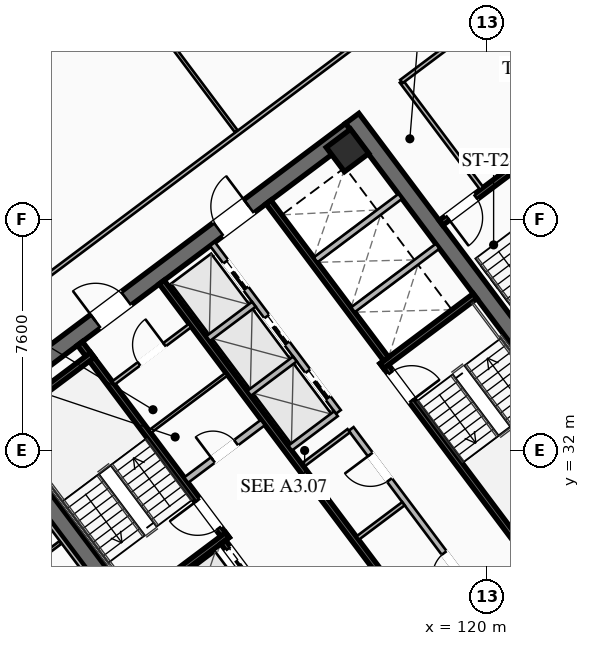
"""IFC4 building model, lengths in metres.
Left out: names, types, materials, properties, quantities, classifications, styles, units other than length and angle.
Written with IfcOpenShell. Run it as: python <this file> out.ifc"""

import sys

from ifc_helpers import new_model, si_unit, direction, frame, frame_2d, origin, origin_2d, place, context, subcontext, project, spatial, rectangle, hollow_rectangle, extrude, element, fill, save


model = new_model("IFC4")
c1 = context("Model", 3, precision=1e-05, world=origin(), true_north=direction((0.0, 1.0)))
c2 = subcontext(c1, "Body", "Model", "MODEL_VIEW")
j1 = project(units=[si_unit("LENGTHUNIT", "METRE"), si_unit("PLANEANGLEUNIT", "RADIAN")], contexts=[c1])
p1 = place(None, origin())
s1 = spatial("IfcSite", under=j1, at=p1, CompositionType="ELEMENT")
p2 = place(p1, origin())
s2 = spatial("IfcBuilding", under=s1, at=p2, CompositionType="ELEMENT")
p3 = place(p2, frame((0.0, 0.0, 142.8)))
s3 = spatial("IfcBuildingStorey", under=s2, at=p3, CompositionType="ELEMENT", Elevation=142.8)
for number, where, z_axis, x_axis in (
    (1, (112.436, 21.077, 0.0), (0.0, 0.0, 1.0), (-0.6, 0.8, 0.0)),
    (2, (115.564, 42.923, 0.0), (0.0, 0.0, 1.0), (0.6, -0.8, 0.0)),
):
    element("IfcWall", number, at=place(p3, frame(where, z_axis=z_axis, x_axis=x_axis)), inside=s3, PredefinedType="SHEAR", context=c2, shape_type="SweptSolid", body=[
        extrude(rectangle(XDim=15.6, YDim=0.55, at=frame_2d((7.8, 0.0))), origin(), (0.0, 0.0, 1.0), 3.55),
    ])
p4 = place(p3, frame((124.539, 30.498, 0.0), z_axis=(0.0, 0.0, 1.0), x_axis=(-0.799998054672, -0.600002593761, 0.0)))
e3 = element("IfcWall", 3, at=p4, inside=s3, PredefinedType="SHEAR", context=c2, shape_type="SweptSolid", body=[
    extrude(rectangle(XDim=15.06, YDim=0.55, at=frame_2d((7.53, 0.0))), origin(), (0.0, 0.0, 1.0), 3.55),
])
p5 = place(p4, frame((9.23, 0.0, 0.0)))
e4 = element("IfcOpeningElement", 4, at=p5, cuts=e3, PredefinedType="OPENING", context=c2, shape_type="SweptSolid", body=[
    extrude(rectangle(XDim=1.25, YDim=2.25, at=frame_2d((0.625, 1.125))), frame((0.0, 0.285, 0.0), z_axis=(0.0, -1.0, 0.0), x_axis=(1.0, 0.0, 0.0)), (0.0, 0.0, 1.0), 0.57),
])
p6 = place(p4, frame((4.18, 0.0, 0.0)))
e5 = element("IfcOpeningElement", 5, at=p6, cuts=e3, PredefinedType="OPENING", context=c2, shape_type="SweptSolid", body=[
    extrude(rectangle(XDim=1.25, YDim=2.25, at=frame_2d((0.625, 1.125))), frame((0.0, 0.285, 0.0), z_axis=(0.0, -1.0, 0.0), x_axis=(1.0, 0.0, 0.0)), (0.0, 0.0, 1.0), 0.57),
])
p7 = place(p3, frame((103.461, 33.502, 0.0), z_axis=(0.0, 0.0, 1.0), x_axis=(0.799998054672, 0.600002593761, 0.0)))
e6 = element("IfcWall", 6, at=p7, inside=s3, PredefinedType="SHEAR", context=c2, shape_type="SweptSolid", body=[
    extrude(rectangle(XDim=15.06, YDim=0.55, at=frame_2d((7.53, 0.0))), origin(), (0.0, 0.0, 1.0), 3.55),
])
p8 = place(p7, frame((4.58, 0.0, 0.0)))
e7 = element("IfcOpeningElement", 7, at=p8, cuts=e6, PredefinedType="OPENING", context=c2, shape_type="SweptSolid", body=[
    extrude(rectangle(XDim=1.25, YDim=2.25, at=frame_2d((0.625, 1.125))), frame((0.0, 0.285, 0.0), z_axis=(0.0, -1.0, 0.0), x_axis=(1.0, 0.0, 0.0)), (0.0, 0.0, 1.0), 0.57),
])
p9 = place(p7, frame((9.63, 0.0, 0.0)))
e8 = element("IfcOpeningElement", 8, at=p9, cuts=e6, PredefinedType="OPENING", context=c2, shape_type="SweptSolid", body=[
    extrude(rectangle(XDim=1.25, YDim=2.25, at=frame_2d((0.625, 1.125))), frame((0.0, 0.285, 0.0), z_axis=(0.0, -1.0, 0.0), x_axis=(1.0, 0.0, 0.0)), (0.0, 0.0, 1.0), 0.57),
])
p10 = place(p3, frame((115.41, 41.87, 0.0), z_axis=(0.0, 0.0, 1.0), x_axis=(0.799999996291, 0.600000004945, 0.0)))
e9 = element("IfcColumn", 9, at=p10, inside=s3, PredefinedType="COLUMN", context=c2, shape_type="SweptSolid", body=[
    extrude(hollow_rectangle(XDim=1.0, YDim=1.0, WallThickness=0.04, at=origin_2d()), origin(), (0.0, 0.0, 1.0), 3.37),
])
p11 = place(p3, frame((111.44, 29.08, 0.0), z_axis=(0.0, 0.0, 1.0), x_axis=(-0.59999029481, 0.8000072788, 0.0)))
e10 = element("IfcWall", 10, at=p11, inside=s3, PredefinedType="SHEAR", context=c2, shape_type="SweptSolid", body=[
    extrude(rectangle(XDim=8.05, YDim=0.2, at=frame_2d((4.025, 0.0))), origin(), (0.0, 0.0, 1.0), 3.37),
])
p12 = place(p11, frame((0.45, 0.0, 0.0)))
e11 = element("IfcOpeningElement", 11, at=p12, cuts=e10, PredefinedType="OPENING", context=c2, shape_type="SweptSolid", body=[
    extrude(rectangle(XDim=1.15, YDim=2.2, at=frame_2d((0.575, 1.1))), frame((0.0, 0.11, 0.0), z_axis=(0.0, -1.0, 0.0), x_axis=(1.0, 0.0, 0.0)), (0.0, 0.0, 1.0), 0.22),
])
for number, where, z_axis, x_axis in (
    (12, (108.396, 26.922, 0.0), (0.0, 0.0, 1.0), (0.8, 0.6, 0.0)),
    (13, (103.956, 32.842, 0.0), (0.0, 0.0, 1.0), (0.8, 0.6, 0.0)),
):
    element("IfcWall", number, at=place(p3, frame(where, z_axis=z_axis, x_axis=x_axis)), inside=s3, PredefinedType="SHEAR", context=c2, shape_type="SweptSolid", body=[
        extrude(rectangle(XDim=3.83, YDim=0.2, at=frame_2d((1.915, 0.0))), origin(), (0.0, 0.0, 1.0), 3.37),
    ])
p13 = place(p3, frame((116.56, 34.92, 0.0), z_axis=(0.0, 0.0, 1.0), x_axis=(0.59999029481, -0.8000072788, 0.0)))
e14 = element("IfcWall", 14, at=p13, inside=s3, PredefinedType="SHEAR", context=c2, shape_type="SweptSolid", body=[
    extrude(rectangle(XDim=8.05, YDim=0.2, at=frame_2d((4.025, 0.0))), origin(), (0.0, 0.0, 1.0), 3.37),
])
p14 = place(p13, frame((0.45, 0.0, 0.0)))
e15 = element("IfcOpeningElement", 15, at=p14, cuts=e14, PredefinedType="OPENING", context=c2, shape_type="SweptSolid", body=[
    extrude(rectangle(XDim=1.15, YDim=2.2, at=frame_2d((0.575, 1.1))), frame((0.0, 0.11, 0.0), z_axis=(0.0, -1.0, 0.0), x_axis=(1.0, 0.0, 0.0)), (0.0, 0.0, 1.0), 0.22),
])
p15 = place(p3, frame((116.54, 34.78, 0.0), z_axis=(0.0, 0.0, 1.0), x_axis=(0.800015298837, 0.599979601008, 0.0)))
e16 = element("IfcWall", 16, at=p15, inside=s3, PredefinedType="SHEAR", context=c2, shape_type="SweptSolid", body=[
    extrude(rectangle(XDim=3.83, YDim=0.2, at=frame_2d((1.915, 0.0))), origin(), (0.0, 0.0, 1.0), 3.37),
])
p16 = place(p3, frame((117.998, 25.936, 0.0), z_axis=(0.0, 0.0, 1.0), x_axis=(-0.600002693989, 0.799997979501, 0.0)))
e17 = element("IfcWall", 17, at=p16, inside=s3, PredefinedType="SHEAR", context=c2, shape_type="SweptSolid", body=[
    extrude(rectangle(XDim=14.5, YDim=0.2, at=frame_2d((7.25, 0.0))), origin(), (0.0, 0.0, 1.0), 3.37),
])
p17 = place(p3, frame((110.104, 31.028, 0.0), z_axis=(0.0, 0.0, 1.0), x_axis=(0.800018601094, 0.59997519774, 0.0)))
e18 = element("IfcWall", 18, at=p17, inside=s3, PredefinedType="SOLIDWALL", context=c2, shape_type="SweptSolid", body=[
    extrude(rectangle(XDim=3.15, YDim=0.22, at=frame_2d((1.575, 0.0))), origin(), (0.0, 0.0, 1.0), 2.723),
])
p18 = place(p17, frame((1.1, 0.0, 0.0)))
e19 = element("IfcOpeningElement", 19, at=p18, cuts=e18, PredefinedType="OPENING", context=c2, shape_type="SweptSolid", body=[
    extrude(rectangle(XDim=0.95, YDim=2.05, at=frame_2d((0.475, 1.025))), frame((0.0, 0.12, 0.0), z_axis=(0.0, -1.0, 0.0), x_axis=(1.0, 0.0, 0.0)), (0.0, 0.0, 1.0), 0.24),
])
p19 = place(p3, frame((115.19, 23.83, 0.0), z_axis=(0.0, 0.0, 1.0), x_axis=(-0.599993943644, 0.800004542231, 0.0)))
e20 = element("IfcWall", 20, at=p19, inside=s3, PredefinedType="SHEAR", context=c2, shape_type="SweptSolid", body=[
    extrude(rectangle(XDim=6.45, YDim=0.2, at=frame_2d((3.225, 0.0))), origin(), (0.0, 0.0, 1.0), 3.37),
])
p20 = place(p19, frame((4.875, 0.0, 0.0)))
e21 = element("IfcOpeningElement", 21, at=p20, cuts=e20, PredefinedType="OPENING", context=c2, shape_type="SweptSolid", body=[
    extrude(rectangle(XDim=1.3, YDim=2.25, at=frame_2d((0.65, 1.125))), frame((0.0, 0.11, 0.0), z_axis=(0.0, -1.0, 0.0), x_axis=(1.0, 0.0, 0.0)), (0.0, 0.0, 1.0), 0.22),
])
p21 = place(p19, frame((2.875, 0.0, 0.0)))
e22 = element("IfcOpeningElement", 22, at=p21, cuts=e20, PredefinedType="OPENING", context=c2, shape_type="SweptSolid", body=[
    extrude(rectangle(XDim=1.3, YDim=2.25, at=frame_2d((0.65, 1.125))), frame((0.0, 0.11, 0.0), z_axis=(0.0, -1.0, 0.0), x_axis=(1.0, 0.0, 0.0)), (0.0, 0.0, 1.0), 0.22),
])
p22 = place(p19, frame((0.675, 0.0, 0.0)))
e23 = element("IfcOpeningElement", 23, at=p22, cuts=e20, PredefinedType="OPENING", context=c2, shape_type="SweptSolid", body=[
    extrude(rectangle(XDim=1.3, YDim=2.25, at=frame_2d((0.65, 1.125))), frame((0.0, 0.11, 0.0), z_axis=(0.0, -1.0, 0.0), x_axis=(1.0, 0.0, 0.0)), (0.0, 0.0, 1.0), 0.22),
])
p23 = place(p3, frame((112.81, 40.17, 0.0), z_axis=(0.0, 0.0, 1.0), x_axis=(0.599993943644, -0.800004542231, 0.0)))
e24 = element("IfcWall", 24, at=p23, inside=s3, PredefinedType="SHEAR", context=c2, shape_type="SweptSolid", body=[
    extrude(rectangle(XDim=6.45, YDim=0.2, at=frame_2d((3.225, 0.0))), origin(), (0.0, 0.0, 1.0), 3.37),
])
for number, where, z_axis, x_axis in (
    (25, (115.59, 36.63, 0.0), (0.0, 0.0, 1.0), (0.8, 0.6, 0.0)),
    (26, (114.36, 38.27, 0.0), (0.0, 0.0, 1.0), (0.8, 0.6, 0.0)),
):
    element("IfcWall", number, at=place(p3, frame(where, z_axis=z_axis, x_axis=x_axis)), inside=s3, PredefinedType="SOLIDWALL", context=c2, shape_type="SweptSolid", body=[
        extrude(rectangle(XDim=3.48, YDim=0.2, at=frame_2d((1.74, 0.0))), origin(), (0.0, 0.0, 1.0), 3.37),
    ])
p24 = place(p3, frame((107.71, 34.22, 0.0), z_axis=(0.0, 0.0, 1.0), x_axis=(0.799981399002, 0.60002480053, 0.0)))
e27 = element("IfcWall", 27, at=p24, inside=s3, PredefinedType="PARTITIONING", context=c2, shape_type="SweptSolid", body=[
    extrude(rectangle(XDim=3.15, YDim=0.135, at=frame_2d((1.575, 0.0))), origin(), (0.0, 0.0, 1.0), 2.723),
])
p25 = place(p24, frame((1.05, 0.0, 0.0)))
e28 = element("IfcOpeningElement", 28, at=p25, cuts=e27, PredefinedType="OPENING", context=c2, shape_type="SweptSolid", body=[
    extrude(rectangle(XDim=1.05, YDim=2.2, at=frame_2d((0.525, 1.1))), frame((0.0, 0.077, 0.0), z_axis=(0.0, -1.0, 0.0), x_axis=(1.0, 0.0, 0.0)), (0.0, 0.0, 1.0), 0.155),
])
p26 = place(p3, frame((108.91, 32.62, 0.0), z_axis=(0.0, 0.0, 1.0), x_axis=(0.800018601094, 0.59997519774, 0.0)))
e29 = element("IfcWall", 29, at=p26, inside=s3, PredefinedType="PARTITIONING", context=c2, shape_type="SweptSolid", body=[
    extrude(rectangle(XDim=3.15, YDim=0.11, at=frame_2d((1.575, 0.0))), origin(), (0.0, 0.0, 1.0), 2.723),
])
p27 = place(p3, frame((119.67, 27.19, 0.0), z_axis=(0.0, 0.0, 1.0), x_axis=(-0.599988677396, 0.800008491828, 0.0)))
e30 = element("IfcWall", 30, at=p27, inside=s3, PredefinedType="SOLIDWALL", context=c2, shape_type="SweptSolid", body=[
    extrude(rectangle(XDim=6.9, YDim=0.2, at=frame_2d((3.45, 0.0))), origin(), (0.0, 0.0, 1.0), 2.723),
])
p28 = place(p27, frame((0.85, 0.0, 0.0)))
e31 = element("IfcOpeningElement", 31, at=p28, cuts=e30, PredefinedType="OPENING", context=c2, shape_type="SweptSolid", body=[
    extrude(rectangle(XDim=0.95, YDim=2.05, at=frame_2d((0.475, 1.025))), frame((0.0, 0.11, 0.0), z_axis=(0.0, -1.0, 0.0), x_axis=(1.0, 0.0, 0.0)), (0.0, 0.0, 1.0), 0.22),
])
p29 = place(p27, frame((4.8, 0.0, 0.0)))
e32 = element("IfcOpeningElement", 32, at=p29, cuts=e30, PredefinedType="OPENING", context=c2, shape_type="SweptSolid", body=[
    extrude(rectangle(XDim=1.05, YDim=2.2, at=frame_2d((0.525, 1.1))), frame((0.0, 0.11, 0.0), z_axis=(0.0, -1.0, 0.0), x_axis=(1.0, 0.0, 0.0)), (0.0, 0.0, 1.0), 0.22),
])
for number, where, z_axis, x_axis in (
    (33, (113.946, 31.522, 0.0), (0.0, 0.0, 1.0), (0.8, 0.6, 0.0)),
    (34, (115.746, 29.122, 0.0), (0.0, 0.0, 1.0), (0.8, 0.6, 0.0)),
):
    element("IfcWall", number, at=place(p3, frame(where, z_axis=z_axis, x_axis=x_axis)), inside=s3, PredefinedType="PARTITIONING", context=c2, shape_type="SweptSolid", body=[
        extrude(rectangle(XDim=1.88, YDim=0.135, at=frame_2d((0.94, 0.0))), origin(), (0.0, 0.0, 1.0), 2.723),
    ])
p30 = place(p3, frame((115.11, 33.27, 0.0), z_axis=(0.0, 0.0, 1.0), x_axis=(-0.600011322243, 0.799991508192, 0.0)))
e35 = element("IfcWall", 35, at=p30, inside=s3, PredefinedType="SOLIDWALL", context=c2, shape_type="SweptSolid", body=[
    extrude(rectangle(XDim=6.9, YDim=0.2, at=frame_2d((3.45, 0.0))), origin(), (0.0, 0.0, 1.0), 3.37),
])
p31 = place(p30, frame((0.575, 0.0, 0.0)))
e36 = element("IfcOpeningElement", 36, at=p31, cuts=e35, PredefinedType="OPENING", context=c2, shape_type="SweptSolid", body=[
    extrude(rectangle(XDim=1.1, YDim=2.2, at=frame_2d((0.55, 1.1))), frame((0.0, 0.11, 0.0), z_axis=(0.0, -1.0, 0.0), x_axis=(1.0, 0.0, 0.0)), (0.0, 0.0, 1.0), 0.22),
])
p32 = place(p30, frame((2.825, 0.0, 0.0)))
e37 = element("IfcOpeningElement", 37, at=p32, cuts=e35, PredefinedType="OPENING", context=c2, shape_type="SweptSolid", body=[
    extrude(rectangle(XDim=1.1, YDim=2.2, at=frame_2d((0.55, 1.1))), frame((0.0, 0.11, 0.0), z_axis=(0.0, -1.0, 0.0), x_axis=(1.0, 0.0, 0.0)), (0.0, 0.0, 1.0), 0.22),
])
p33 = place(p30, frame((5.075, 0.0, 0.0)))
e38 = element("IfcOpeningElement", 38, at=p33, cuts=e35, PredefinedType="OPENING", context=c2, shape_type="SweptSolid", body=[
    extrude(rectangle(XDim=1.1, YDim=2.2, at=frame_2d((0.55, 1.1))), frame((0.0, 0.11, 0.0), z_axis=(0.0, -1.0, 0.0), x_axis=(1.0, 0.0, 0.0)), (0.0, 0.0, 1.0), 0.22),
])
p34 = place(p3, frame((113.526, 32.082, 0.0), z_axis=(0.0, 0.0, 1.0), x_axis=(0.800046745961, 0.599937666993, 0.0)))
e39 = element("IfcWall", 39, at=p34, inside=s3, PredefinedType="SOLIDWALL", context=c2, shape_type="SweptSolid", body=[
    extrude(rectangle(XDim=1.88, YDim=0.2, at=frame_2d((0.94, 0.0))), origin(), (0.0, 0.0, 1.0), 3.37),
])
p35 = place(p3, frame((112.176, 33.882, 0.0), z_axis=(0.0, 0.0, 1.0), x_axis=(0.8, 0.6, 0.0)))
e40 = element("IfcWall", 40, at=p35, inside=s3, PredefinedType="SOLIDWALL", context=c2, shape_type="SweptSolid", body=[
    extrude(rectangle(XDim=1.88, YDim=0.2, at=frame_2d((0.94, 0.0))), origin(), (0.0, 0.0, 1.0), 3.37),
])
p36 = place(p3, frame((110.826, 35.682, 0.0), z_axis=(0.0, 0.0, 1.0), x_axis=(0.799984418148, 0.600020775241, 0.0)))
e41 = element("IfcWall", 41, at=p36, inside=s3, PredefinedType="SOLIDWALL", context=c2, shape_type="SweptSolid", body=[
    extrude(rectangle(XDim=1.88, YDim=0.2, at=frame_2d((0.94, 0.0))), origin(), (0.0, 0.0, 1.0), 3.37),
])
p37 = place(p3, frame((121.204, 41.528, 0.0), z_axis=(0.0, 0.0, 1.0), x_axis=(-0.800017232136, -0.599977023131, 0.0)))
e42 = element("IfcWall", 42, at=p37, inside=s3, PredefinedType="SHEAR", context=c2, shape_type="SweptSolid", body=[
    extrude(rectangle(XDim=3.4, YDim=0.2, at=frame_2d((1.7, 0.0))), origin(), (0.0, 0.0, 1.0), 3.37),
])
p38 = place(p37, frame((1.975, 0.0, 0.0)))
e43 = element("IfcOpeningElement", 43, at=p38, cuts=e42, PredefinedType="OPENING", context=c2, shape_type="SweptSolid", body=[
    extrude(rectangle(XDim=1.15, YDim=2.2, at=frame_2d((0.575, 1.1))), frame((0.0, 0.11, 0.0), z_axis=(0.0, -1.0, 0.0), x_axis=(1.0, 0.0, 0.0)), (0.0, 0.0, 1.0), 0.22),
])
p39 = place(p3, frame((119.824, 40.618, 0.0), z_axis=(0.0, 0.0, 1.0), x_axis=(-0.599982243973, 0.800013316712, 0.0)))
e44 = element("IfcWall", 44, at=p39, inside=s3, PredefinedType="PARTITIONING", context=c2, shape_type="SweptSolid", body=[
    extrude(rectangle(XDim=4.4, YDim=0.135, at=frame_2d((2.2, 0.0))), origin(), (0.0, 0.0, 1.0), 2.723),
])
p40 = place(p3, frame((95.678, 30.346, 0.0), z_axis=(0.0, 0.0, 1.0), x_axis=(0.8, 0.6, 0.0)))
e45 = element("IfcWall", 45, at=p40, inside=s3, PredefinedType="PARTITIONING", context=c2, shape_type="SweptSolid", body=[
    extrude(rectangle(XDim=31.3, YDim=0.135, at=frame_2d((15.65, 0.0))), origin(), (0.0, 0.0, 1.0), 2.723),
])
p41 = place(p40, frame((0.3, 0.0, 0.0)))
e46 = element("IfcOpeningElement", 46, at=p41, cuts=e45, PredefinedType="OPENING", context=c2, shape_type="SweptSolid", body=[
    extrude(rectangle(XDim=0.95, YDim=2.05, at=frame_2d((0.475, 1.025))), frame((0.0, 0.077, 0.0), z_axis=(0.0, -1.0, 0.0), x_axis=(1.0, 0.0, 0.0)), (0.0, 0.0, 1.0), 0.155),
])
p42 = place(p40, frame((30.05, 0.0, 0.0)))
e47 = element("IfcOpeningElement", 47, at=p42, cuts=e45, PredefinedType="OPENING", context=c2, shape_type="SweptSolid", body=[
    extrude(rectangle(XDim=0.95, YDim=2.05, at=frame_2d((0.475, 1.025))), frame((0.0, 0.077, 0.0), z_axis=(0.0, -1.0, 0.0), x_axis=(1.0, 0.0, 0.0)), (0.0, 0.0, 1.0), 0.155),
])
p43 = place(p3, frame((111.75, 42.5, 0.0), z_axis=(0.0, 0.0, 1.0), x_axis=(-0.599995420528, 0.800003434584, 0.0)))
e48 = element("IfcWall", 48, at=p43, inside=s3, PredefinedType="PARTITIONING", context=c2, shape_type="SweptSolid", body=[
    extrude(rectangle(XDim=8.53, YDim=0.11, at=frame_2d((4.265, 0.0))), origin(), (0.0, 0.0, 1.0), 2.723),
])
p44 = place(p3, frame((132.13, 33.91, 0.0), z_axis=(0.0, 0.0, 1.0), x_axis=(-0.799997191971, -0.600003744021, 0.0)))
e49 = element("IfcWall", 49, at=p44, inside=s3, PredefinedType="PARTITIONING", context=c2, shape_type="SweptSolid", body=[
    extrude(rectangle(XDim=31.3, YDim=0.135, at=frame_2d((15.65, 0.0))), origin(), (0.0, 0.0, 1.0), 2.723),
])
p45 = place(p44, frame((29.97, 0.0, 0.0)))
e50 = element("IfcOpeningElement", 50, at=p45, cuts=e49, PredefinedType="OPENING", context=c2, shape_type="SweptSolid", body=[
    extrude(rectangle(XDim=0.95, YDim=2.05, at=frame_2d((0.475, 1.025))), frame((0.0, 0.077, 0.0), z_axis=(0.0, -1.0, 0.0), x_axis=(1.0, 0.0, 0.0)), (0.0, 0.0, 1.0), 0.155),
])
p46 = place(p44, frame((0.38, 0.0, 0.0)))
e51 = element("IfcOpeningElement", 51, at=p46, cuts=e49, PredefinedType="OPENING", context=c2, shape_type="SweptSolid", body=[
    extrude(rectangle(XDim=0.95, YDim=2.05, at=frame_2d((0.475, 1.025))), frame((0.0, 0.077, 0.0), z_axis=(0.0, -1.0, 0.0), x_axis=(1.0, 0.0, 0.0)), (0.0, 0.0, 1.0), 0.155),
])
p47 = place(p3, frame((123.944, 49.208, 0.0), z_axis=(0.0, 0.0, 1.0), x_axis=(-0.799996532921, -0.600004622744, 0.0)))
e52 = element("IfcWall", 52, at=p47, inside=s3, PredefinedType="PARTITIONING", context=c2, shape_type="SweptSolid", body=[
    extrude(rectangle(XDim=8.45, YDim=0.135, at=frame_2d((4.225, 0.0))), origin(), (0.0, 0.0, 1.0), 2.723),
])
p48 = place(p47, frame((4.1, 0.0, 0.0)))
e53 = element("IfcOpeningElement", 53, at=p48, cuts=e52, PredefinedType="OPENING", context=c2, shape_type="SweptSolid", body=[
    extrude(rectangle(XDim=0.95, YDim=2.05, at=frame_2d((0.475, 1.025))), frame((0.0, 0.077, 0.0), z_axis=(0.0, -1.0, 0.0), x_axis=(1.0, 0.0, 0.0)), (0.0, 0.0, 1.0), 0.155),
])
p49 = place(p3, frame((112.104, 20.928, 0.0), z_axis=(0.0, 0.0, 1.0), x_axis=(-0.599994940075, 0.800003794918, 0.0)))
e54 = element("IfcWall", 54, at=p49, inside=s3, PredefinedType="PARTITIONING", context=c2, shape_type="SweptSolid", body=[
    extrude(rectangle(XDim=15.44, YDim=0.135, at=frame_2d((7.72, 0.0))), origin(), (0.0, 0.0, 1.0), 2.723),
])
p50 = place(p3, frame((98.056, 23.042, 0.0), z_axis=(0.0, 0.0, 1.0), x_axis=(0.8, 0.6, 0.0)))
e55 = element("IfcWall", 55, at=p50, inside=s3, PredefinedType="PARTITIONING", context=c2, shape_type="SweptSolid", body=[
    extrude(rectangle(XDim=9.89, YDim=0.11, at=frame_2d((4.945, 0.0))), origin(), (0.0, 0.0, 1.0), 2.723),
])
p51 = place(p8, origin())
e56 = element("IfcDoor", 56, at=p51, inside=s3, OperationType="SINGLE_SWING_LEFT", PredefinedType="DOOR", context=c2, shape_type="SweptSolid", body=[
    extrude(rectangle(XDim=1.25, YDim=2.25, at=frame_2d((0.625, 1.125))), frame((0.0, 0.025, 0.0), z_axis=(0.0, -1.0, 0.0), x_axis=(1.0, 0.0, 0.0)), (0.0, 0.0, 1.0), 0.05),
])
fill(e7, e56)
p52 = place(p9, origin())
e57 = element("IfcDoor", 57, at=p52, inside=s3, OperationType="SINGLE_SWING_RIGHT", PredefinedType="DOOR", context=c2, shape_type="SweptSolid", body=[
    extrude(rectangle(XDim=1.25, YDim=2.25, at=frame_2d((0.625, 1.125))), frame((0.0, 0.025, 0.0), z_axis=(0.0, -1.0, 0.0), x_axis=(1.0, 0.0, 0.0)), (0.0, 0.0, 1.0), 0.05),
])
fill(e8, e57)
p53 = place(p12, origin())
e58 = element("IfcDoor", 58, at=p53, inside=s3, OperationType="SINGLE_SWING_RIGHT", PredefinedType="DOOR", context=c2, shape_type="SweptSolid", body=[
    extrude(rectangle(XDim=1.15, YDim=2.2, at=frame_2d((0.575, 1.1))), frame((0.0, 0.025, 0.0), z_axis=(0.0, -1.0, 0.0), x_axis=(1.0, 0.0, 0.0)), (0.0, 0.0, 1.0), 0.05),
])
fill(e11, e58)
p54 = place(p14, origin())
e59 = element("IfcDoor", 59, at=p54, inside=s3, OperationType="SINGLE_SWING_RIGHT", PredefinedType="DOOR", context=c2, shape_type="SweptSolid", body=[
    extrude(rectangle(XDim=1.15, YDim=2.2, at=frame_2d((0.575, 1.1))), frame((0.0, 0.025, 0.0), z_axis=(0.0, -1.0, 0.0), x_axis=(1.0, 0.0, 0.0)), (0.0, 0.0, 1.0), 0.05),
])
fill(e15, e59)
p55 = place(p25, origin())
e60 = element("IfcDoor", 60, at=p55, inside=s3, OperationType="SINGLE_SWING_RIGHT", PredefinedType="DOOR", context=c2, shape_type="SweptSolid", body=[
    extrude(rectangle(XDim=1.05, YDim=2.2, at=frame_2d((0.525, 1.1))), frame((0.0, 0.025, 0.0), z_axis=(0.0, -1.0, 0.0), x_axis=(1.0, 0.0, 0.0)), (0.0, 0.0, 1.0), 0.05),
])
fill(e28, e60)
p56 = place(p18, origin())
e61 = element("IfcDoor", 61, at=p56, inside=s3, OperationType="SINGLE_SWING_LEFT", PredefinedType="DOOR", context=c2, shape_type="SweptSolid", body=[
    extrude(rectangle(XDim=0.95, YDim=2.05, at=frame_2d((0.475, 1.025))), frame((0.0, 0.025, 0.0), z_axis=(0.0, -1.0, 0.0), x_axis=(1.0, 0.0, 0.0)), (0.0, 0.0, 1.0), 0.05),
])
fill(e19, e61)
p57 = place(p28, origin())
e62 = element("IfcDoor", 62, at=p57, inside=s3, OperationType="SINGLE_SWING_LEFT", PredefinedType="DOOR", context=c2, shape_type="SweptSolid", body=[
    extrude(rectangle(XDim=0.95, YDim=2.05, at=frame_2d((0.475, 1.025))), frame((0.0, 0.025, 0.0), z_axis=(0.0, -1.0, 0.0), x_axis=(1.0, 0.0, 0.0)), (0.0, 0.0, 1.0), 0.05),
])
fill(e31, e62)
p58 = place(p29, origin())
e63 = element("IfcDoor", 63, at=p58, inside=s3, OperationType="SINGLE_SWING_RIGHT", PredefinedType="DOOR", context=c2, shape_type="SweptSolid", body=[
    extrude(rectangle(XDim=1.05, YDim=2.2, at=frame_2d((0.525, 1.1))), frame((0.0, 0.025, 0.0), z_axis=(0.0, -1.0, 0.0), x_axis=(1.0, 0.0, 0.0)), (0.0, 0.0, 1.0), 0.05),
])
fill(e32, e63)
p59 = place(p38, origin())
e64 = element("IfcDoor", 64, at=p59, inside=s3, OperationType="SINGLE_SWING_RIGHT", PredefinedType="DOOR", context=c2, shape_type="SweptSolid", body=[
    extrude(rectangle(XDim=1.15, YDim=2.2, at=frame_2d((0.575, 1.1))), frame((0.0, 0.025, 0.0), z_axis=(0.0, -1.0, 0.0), x_axis=(1.0, 0.0, 0.0)), (0.0, 0.0, 1.0), 0.05),
])
fill(e43, e64)
p60 = place(p20, origin())
e65 = element("IfcDoor", 65, at=p60, inside=s3, OperationType="SLIDING_TO_LEFT", PredefinedType="DOOR", context=c2, shape_type="SweptSolid", body=[
    extrude(rectangle(XDim=1.3, YDim=2.25, at=frame_2d((0.65, 1.125))), frame((0.0, 0.025, 0.0), z_axis=(0.0, -1.0, 0.0), x_axis=(1.0, 0.0, 0.0)), (0.0, 0.0, 1.0), 0.05),
])
fill(e21, e65)
p61 = place(p31, origin())
e66 = element("IfcDoor", 66, at=p61, inside=s3, OperationType="SLIDING_TO_LEFT", PredefinedType="DOOR", context=c2, shape_type="SweptSolid", body=[
    extrude(rectangle(XDim=1.1, YDim=2.2, at=frame_2d((0.55, 1.1))), frame((0.0, 0.025, 0.0), z_axis=(0.0, -1.0, 0.0), x_axis=(1.0, 0.0, 0.0)), (0.0, 0.0, 1.0), 0.05),
])
fill(e36, e66)
p62 = place(p32, origin())
e67 = element("IfcDoor", 67, at=p62, inside=s3, OperationType="SLIDING_TO_LEFT", PredefinedType="DOOR", context=c2, shape_type="SweptSolid", body=[
    extrude(rectangle(XDim=1.1, YDim=2.2, at=frame_2d((0.55, 1.1))), frame((0.0, 0.025, 0.0), z_axis=(0.0, -1.0, 0.0), x_axis=(1.0, 0.0, 0.0)), (0.0, 0.0, 1.0), 0.05),
])
fill(e37, e67)
p63 = place(p33, origin())
e68 = element("IfcDoor", 68, at=p63, inside=s3, OperationType="SLIDING_TO_LEFT", PredefinedType="DOOR", context=c2, shape_type="SweptSolid", body=[
    extrude(rectangle(XDim=1.1, YDim=2.2, at=frame_2d((0.55, 1.1))), frame((0.0, 0.025, 0.0), z_axis=(0.0, -1.0, 0.0), x_axis=(1.0, 0.0, 0.0)), (0.0, 0.0, 1.0), 0.05),
])
fill(e38, e68)
save(model, sys.argv[1])
